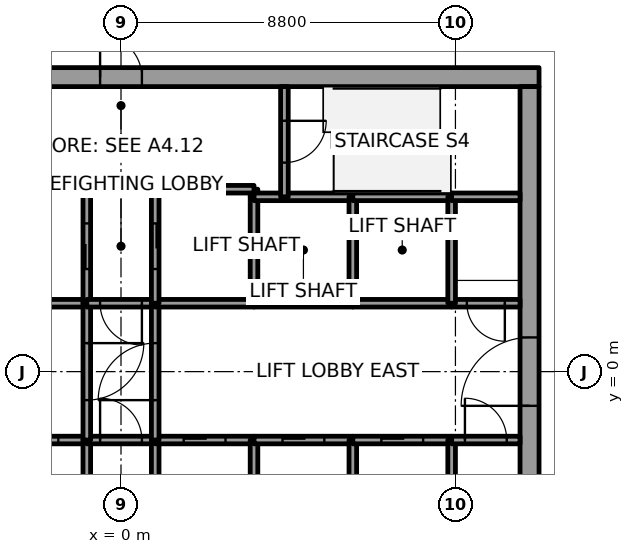
"""IFC4 building model, lengths in metres.
Left out: names, types, materials, properties, quantities, classifications, styles, units other than length and angle.
Written with IfcOpenShell. Run it as: python <this file> out.ifc"""

import sys

from ifc_helpers import new_model, si_unit, direction, frame, frame_2d, origin, place, context, subcontext, project, spatial, rectangle, extrude, element, fill, save


model = new_model("IFC4")
c1 = context("Model", 3, precision=1e-05, world=origin(), true_north=direction((0.0, 1.0)))
c2 = subcontext(c1, "Body", "Model", "MODEL_VIEW")
j1 = project(units=[si_unit("LENGTHUNIT", "METRE"), si_unit("PLANEANGLEUNIT", "RADIAN")], contexts=[c1])
p1 = place(None, origin())
s1 = spatial("IfcSite", under=j1, at=p1, CompositionType="ELEMENT")
p2 = place(p1, origin())
s2 = spatial("IfcBuilding", under=s1, at=p2, CompositionType="ELEMENT")
p3 = place(p2, frame((0.0, 0.0, 59.1)))
s3 = spatial("IfcBuildingStorey", under=s2, at=p3, CompositionType="ELEMENT", Elevation=59.1)
p4 = place(p3, frame((-11.0, 7.75, 0.0), z_axis=(0.0, 0.0, 1.0), x_axis=(1.0, 0.0, 0.0)))
e1 = element("IfcWall", 1, at=p4, inside=s3, PredefinedType="SHEAR", context=c2, shape_type="SweptSolid", body=[
    extrude(rectangle(XDim=22.0, YDim=0.5, at=frame_2d((11.0, 0.0))), origin(), (0.0, 0.0, 1.0), 3.7),
])
p5 = place(p4, frame((10.45, 0.0, 0.0)))
e2 = element("IfcOpeningElement", 2, at=p5, cuts=e1, PredefinedType="OPENING", context=c2, shape_type="SweptSolid", body=[
    extrude(rectangle(XDim=1.1, YDim=2.1, at=frame_2d((0.55, 1.05))), frame((0.0, 0.25, 0.0), z_axis=(0.0, -1.0, 0.0), x_axis=(1.0, 0.0, 0.0)), (0.0, 0.0, 1.0), 0.5),
])
p6 = place(p3, frame((10.75, -7.5, 0.0), z_axis=(0.0, 0.0, 1.0), x_axis=(0.0, 1.0, 0.0)))
e3 = element("IfcWall", 3, at=p6, inside=s3, PredefinedType="SHEAR", context=c2, shape_type="SweptSolid", body=[
    extrude(rectangle(XDim=15.0, YDim=0.5, at=frame_2d((7.5, 0.0))), origin(), (0.0, 0.0, 1.0), 3.7),
])
p7 = place(p6, frame((6.6, 0.0, 0.0)))
e4 = element("IfcOpeningElement", 4, at=p7, cuts=e3, PredefinedType="OPENING", context=c2, shape_type="SweptSolid", body=[
    extrude(rectangle(XDim=1.8, YDim=2.1, at=frame_2d((0.9, 1.05))), frame((0.0, 0.25, 0.0), z_axis=(0.0, -1.0, 0.0), x_axis=(1.0, 0.0, 0.0)), (0.0, 0.0, 1.0), 0.5),
])
p8 = place(p3, frame((-3.5, -1.8, 0.0), z_axis=(0.0, 0.0, 1.0), x_axis=(1.0, 0.0, 0.0)))
e5 = element("IfcWall", 5, at=p8, inside=s3, PredefinedType="SOLIDWALL", context=c2, shape_type="SweptSolid", body=[
    extrude(rectangle(XDim=2.6, YDim=0.2, at=frame_2d((1.3, 0.0))), origin(), (0.0, 0.0, 1.0), 3.55),
])
p9 = place(p8, frame((0.75, 0.0, 0.0)))
e6 = element("IfcOpeningElement", 6, at=p9, cuts=e5, PredefinedType="OPENING", context=c2, shape_type="SweptSolid", body=[
    extrude(rectangle(XDim=1.1, YDim=2.1, at=frame_2d((0.55, 1.05))), frame((0.0, 0.1, 0.0), z_axis=(0.0, -1.0, 0.0), x_axis=(1.0, 0.0, 0.0)), (0.0, 0.0, 1.0), 0.2),
])
p10 = place(p3, frame((-0.9, 1.8, 0.0), z_axis=(0.0, 0.0, 1.0), x_axis=(-1.0, 0.0, 0.0)))
e7 = element("IfcWall", 7, at=p10, inside=s3, PredefinedType="SOLIDWALL", context=c2, shape_type="SweptSolid", body=[
    extrude(rectangle(XDim=2.6, YDim=0.2, at=frame_2d((1.3, 0.0))), origin(), (0.0, 0.0, 1.0), 3.55),
])
p11 = place(p3, frame((-0.9, 1.8, 0.0), z_axis=(0.0, 0.0, 1.0), x_axis=(0.0, 1.0, 0.0)))
e8 = element("IfcWall", 8, at=p11, inside=s3, PredefinedType="SOLIDWALL", context=c2, shape_type="SweptSolid", body=[
    extrude(rectangle(XDim=3.0, YDim=0.2, at=frame_2d((1.5, 0.0))), origin(), (0.0, 0.0, 1.0), 3.55),
])
p12 = place(p11, frame((0.9, 0.0, 0.0)))
e9 = element("IfcOpeningElement", 9, at=p12, cuts=e8, PredefinedType="OPENING", context=c2, shape_type="SweptSolid", body=[
    extrude(rectangle(XDim=1.2, YDim=2.1, at=frame_2d((0.6, 1.05))), frame((0.0, 0.1, 0.0), z_axis=(0.0, -1.0, 0.0), x_axis=(1.0, 0.0, 0.0)), (0.0, 0.0, 1.0), 0.2),
])
p13 = place(p3, frame((-0.9, 4.8, 0.0), z_axis=(0.0, 0.0, 1.0), x_axis=(-1.0, 0.0, 0.0)))
e10 = element("IfcWall", 10, at=p13, inside=s3, PredefinedType="SOLIDWALL", context=c2, shape_type="SweptSolid", body=[
    extrude(rectangle(XDim=2.6, YDim=0.2, at=frame_2d((1.3, 0.0))), origin(), (0.0, 0.0, 1.0), 3.55),
])
p14 = place(p3, frame((-0.9, -4.6, 0.0), z_axis=(0.0, 0.0, 1.0), x_axis=(0.0, 1.0, 0.0)))
e11 = element("IfcWall", 11, at=p14, inside=s3, PredefinedType="SOLIDWALL", context=c2, shape_type="SweptSolid", body=[
    extrude(rectangle(XDim=2.8, YDim=0.2, at=frame_2d((1.4, 0.0))), origin(), (0.0, 0.0, 1.0), 3.55),
])
p15 = place(p3, frame((-0.9, -1.8, 0.0), z_axis=(0.0, 0.0, 1.0), x_axis=(1.0, 0.0, 0.0)))
e12 = element("IfcWall", 12, at=p15, inside=s3, PredefinedType="SOLIDWALL", context=c2, shape_type="SweptSolid", body=[
    extrude(rectangle(XDim=1.8, YDim=0.2, at=frame_2d((0.9, 0.0))), origin(), (0.0, 0.0, 1.0), 3.55),
])
p16 = place(p15, frame((0.35, 0.0, 0.0)))
e13 = element("IfcOpeningElement", 13, at=p16, cuts=e12, PredefinedType="OPENING", context=c2, shape_type="SweptSolid", body=[
    extrude(rectangle(XDim=1.1, YDim=2.1, at=frame_2d((0.55, 1.05))), frame((0.0, 0.1, 0.0), z_axis=(0.0, -1.0, 0.0), x_axis=(1.0, 0.0, 0.0)), (0.0, 0.0, 1.0), 0.2),
])
p17 = place(p3, frame((-0.9, 1.8, 0.0), z_axis=(0.0, 0.0, 1.0), x_axis=(0.0, -1.0, 0.0)))
e14 = element("IfcWall", 14, at=p17, inside=s3, PredefinedType="SOLIDWALL", context=c2, shape_type="SweptSolid", body=[
    extrude(rectangle(XDim=3.6, YDim=0.2, at=frame_2d((1.8, 0.0))), origin(), (0.0, 0.0, 1.0), 3.55),
])
p18 = place(p17, frame((1.05, 0.0, 0.0)))
e15 = element("IfcOpeningElement", 15, at=p18, cuts=e14, PredefinedType="OPENING", context=c2, shape_type="SweptSolid", body=[
    extrude(rectangle(XDim=1.5, YDim=2.1, at=frame_2d((0.75, 1.05))), frame((0.0, 0.1, 0.0), z_axis=(0.0, -1.0, 0.0), x_axis=(1.0, 0.0, 0.0)), (0.0, 0.0, 1.0), 0.2),
])
p19 = place(p3, frame((0.9, 1.8, 0.0), z_axis=(0.0, 0.0, 1.0), x_axis=(-1.0, 0.0, 0.0)))
e16 = element("IfcWall", 16, at=p19, inside=s3, PredefinedType="SOLIDWALL", context=c2, shape_type="SweptSolid", body=[
    extrude(rectangle(XDim=1.8, YDim=0.2, at=frame_2d((0.9, 0.0))), origin(), (0.0, 0.0, 1.0), 3.55),
])
p20 = place(p19, frame((0.35, 0.0, 0.0)))
e17 = element("IfcOpeningElement", 17, at=p20, cuts=e16, PredefinedType="OPENING", context=c2, shape_type="SweptSolid", body=[
    extrude(rectangle(XDim=1.1, YDim=2.1, at=frame_2d((0.55, 1.05))), frame((0.0, 0.1, 0.0), z_axis=(0.0, -1.0, 0.0), x_axis=(1.0, 0.0, 0.0)), (0.0, 0.0, 1.0), 0.2),
])
p21 = place(p3, frame((0.9, -1.8, 0.0), z_axis=(0.0, 0.0, 1.0), x_axis=(0.0, -1.0, 0.0)))
e18 = element("IfcWall", 18, at=p21, inside=s3, PredefinedType="SOLIDWALL", context=c2, shape_type="SweptSolid", body=[
    extrude(rectangle(XDim=2.8, YDim=0.2, at=frame_2d((1.4, 0.0))), origin(), (0.0, 0.0, 1.0), 3.55),
])
p22 = place(p3, frame((0.9, -1.8, 0.0), z_axis=(0.0, 0.0, 1.0), x_axis=(1.0, 0.0, 0.0)))
e19 = element("IfcWall", 19, at=p22, inside=s3, PredefinedType="SOLIDWALL", context=c2, shape_type="SweptSolid", body=[
    extrude(rectangle(XDim=2.6, YDim=0.2, at=frame_2d((1.3, 0.0))), origin(), (0.0, 0.0, 1.0), 3.55),
])
p23 = place(p22, frame((0.75, 0.0, 0.0)))
e20 = element("IfcOpeningElement", 20, at=p23, cuts=e19, PredefinedType="OPENING", context=c2, shape_type="SweptSolid", body=[
    extrude(rectangle(XDim=1.1, YDim=2.1, at=frame_2d((0.55, 1.05))), frame((0.0, 0.1, 0.0), z_axis=(0.0, -1.0, 0.0), x_axis=(1.0, 0.0, 0.0)), (0.0, 0.0, 1.0), 0.2),
])
p24 = place(p3, frame((0.9, -1.8, 0.0), z_axis=(0.0, 0.0, 1.0), x_axis=(0.0, 1.0, 0.0)))
e21 = element("IfcWall", 21, at=p24, inside=s3, PredefinedType="SOLIDWALL", context=c2, shape_type="SweptSolid", body=[
    extrude(rectangle(XDim=3.6, YDim=0.2, at=frame_2d((1.8, 0.0))), origin(), (0.0, 0.0, 1.0), 3.55),
])
p25 = place(p24, frame((1.05, 0.0, 0.0)))
e22 = element("IfcOpeningElement", 22, at=p25, cuts=e21, PredefinedType="OPENING", context=c2, shape_type="SweptSolid", body=[
    extrude(rectangle(XDim=1.5, YDim=2.1, at=frame_2d((0.75, 1.05))), frame((0.0, 0.1, 0.0), z_axis=(0.0, -1.0, 0.0), x_axis=(1.0, 0.0, 0.0)), (0.0, 0.0, 1.0), 0.2),
])
p26 = place(p3, frame((3.5, 1.8, 0.0), z_axis=(0.0, 0.0, 1.0), x_axis=(-1.0, 0.0, 0.0)))
e23 = element("IfcWall", 23, at=p26, inside=s3, PredefinedType="SOLIDWALL", context=c2, shape_type="SweptSolid", body=[
    extrude(rectangle(XDim=2.6, YDim=0.2, at=frame_2d((1.3, 0.0))), origin(), (0.0, 0.0, 1.0), 3.55),
])
p27 = place(p3, frame((3.5, 4.6, 0.0), z_axis=(0.0, 0.0, 1.0), x_axis=(0.0, 1.0, 0.0)))
e24 = element("IfcWall", 24, at=p27, inside=s3, PredefinedType="SOLIDWALL", context=c2, shape_type="SweptSolid", body=[
    extrude(rectangle(XDim=0.2, YDim=0.2, at=frame_2d((0.1, 0.0))), origin(), (0.0, 0.0, 1.0), 3.55),
])
p28 = place(p3, frame((3.5, 4.8, 0.0), z_axis=(0.0, 0.0, 1.0), x_axis=(-1.0, 0.0, 0.0)))
e25 = element("IfcWall", 25, at=p28, inside=s3, PredefinedType="SOLIDWALL", context=c2, shape_type="SweptSolid", body=[
    extrude(rectangle(XDim=2.6, YDim=0.2, at=frame_2d((1.3, 0.0))), origin(), (0.0, 0.0, 1.0), 3.55),
])
p29 = place(p3, frame((0.9, 4.8, 0.0), z_axis=(0.0, 0.0, 1.0), x_axis=(0.0, -1.0, 0.0)))
e26 = element("IfcWall", 26, at=p29, inside=s3, PredefinedType="SOLIDWALL", context=c2, shape_type="SweptSolid", body=[
    extrude(rectangle(XDim=3.0, YDim=0.2, at=frame_2d((1.5, 0.0))), origin(), (0.0, 0.0, 1.0), 3.55),
])
p30 = place(p29, frame((0.9, 0.0, 0.0)))
e27 = element("IfcOpeningElement", 27, at=p30, cuts=e26, PredefinedType="OPENING", context=c2, shape_type="SweptSolid", body=[
    extrude(rectangle(XDim=1.2, YDim=2.1, at=frame_2d((0.6, 1.05))), frame((0.0, 0.1, 0.0), z_axis=(0.0, -1.0, 0.0), x_axis=(1.0, 0.0, 0.0)), (0.0, 0.0, 1.0), 0.2),
])
p31 = place(p3, frame((3.5, -4.6, 0.0), z_axis=(0.0, 0.0, 1.0), x_axis=(0.0, 1.0, 0.0)))
e28 = element("IfcWall", 28, at=p31, inside=s3, PredefinedType="SOLIDWALL", context=c2, shape_type="SweptSolid", body=[
    extrude(rectangle(XDim=2.8, YDim=0.2, at=frame_2d((1.4, 0.0))), origin(), (0.0, 0.0, 1.0), 3.55),
])
p32 = place(p3, frame((3.5, -1.8, 0.0), z_axis=(0.0, 0.0, 1.0), x_axis=(1.0, 0.0, 0.0)))
e29 = element("IfcWall", 29, at=p32, inside=s3, PredefinedType="SOLIDWALL", context=c2, shape_type="SweptSolid", body=[
    extrude(rectangle(XDim=2.6, YDim=0.2, at=frame_2d((1.3, 0.0))), origin(), (0.0, 0.0, 1.0), 3.55),
])
p33 = place(p32, frame((0.75, 0.0, 0.0)))
e30 = element("IfcOpeningElement", 30, at=p33, cuts=e29, PredefinedType="OPENING", context=c2, shape_type="SweptSolid", body=[
    extrude(rectangle(XDim=1.1, YDim=2.1, at=frame_2d((0.55, 1.05))), frame((0.0, 0.1, 0.0), z_axis=(0.0, -1.0, 0.0), x_axis=(1.0, 0.0, 0.0)), (0.0, 0.0, 1.0), 0.2),
])
p34 = place(p3, frame((6.1, 1.8, 0.0), z_axis=(0.0, 0.0, 1.0), x_axis=(-1.0, 0.0, 0.0)))
e31 = element("IfcWall", 31, at=p34, inside=s3, PredefinedType="SOLIDWALL", context=c2, shape_type="SweptSolid", body=[
    extrude(rectangle(XDim=2.6, YDim=0.2, at=frame_2d((1.3, 0.0))), origin(), (0.0, 0.0, 1.0), 3.55),
])
p35 = place(p3, frame((3.5, 1.8, 0.0), z_axis=(0.0, 0.0, 1.0), x_axis=(0.0, 1.0, 0.0)))
e32 = element("IfcWall", 32, at=p35, inside=s3, PredefinedType="SOLIDWALL", context=c2, shape_type="SweptSolid", body=[
    extrude(rectangle(XDim=2.8, YDim=0.2, at=frame_2d((1.4, 0.0))), origin(), (0.0, 0.0, 1.0), 3.55),
])
p36 = place(p3, frame((4.3, 4.6, 0.0), z_axis=(0.0, 0.0, 1.0), x_axis=(-1.0, 0.0, 0.0)))
e33 = element("IfcWall", 33, at=p36, inside=s3, PredefinedType="SOLIDWALL", context=c2, shape_type="SweptSolid", body=[
    extrude(rectangle(XDim=0.8, YDim=0.2, at=frame_2d((0.4, 0.0))), origin(), (0.0, 0.0, 1.0), 3.55),
])
p37 = place(p3, frame((6.1, 4.6, 0.0), z_axis=(0.0, 0.0, 1.0), x_axis=(-1.0, 0.0, 0.0)))
e34 = element("IfcWall", 34, at=p37, inside=s3, PredefinedType="SOLIDWALL", context=c2, shape_type="SweptSolid", body=[
    extrude(rectangle(XDim=1.8, YDim=0.2, at=frame_2d((0.9, 0.0))), origin(), (0.0, 0.0, 1.0), 3.55),
])
p38 = place(p3, frame((4.3, 7.5, 0.0), z_axis=(0.0, 0.0, 1.0), x_axis=(0.0, -1.0, 0.0)))
e35 = element("IfcWall", 35, at=p38, inside=s3, PredefinedType="SOLIDWALL", context=c2, shape_type="SweptSolid", body=[
    extrude(rectangle(XDim=2.9, YDim=0.2, at=frame_2d((1.45, 0.0))), origin(), (0.0, 0.0, 1.0), 3.55),
])
p39 = place(p38, frame((0.9, 0.0, 0.0)))
e36 = element("IfcOpeningElement", 36, at=p39, cuts=e35, PredefinedType="OPENING", context=c2, shape_type="SweptSolid", body=[
    extrude(rectangle(XDim=1.1, YDim=2.1, at=frame_2d((0.55, 1.05))), frame((0.0, 0.1, 0.0), z_axis=(0.0, -1.0, 0.0), x_axis=(1.0, 0.0, 0.0)), (0.0, 0.0, 1.0), 0.2),
])
p40 = place(p3, frame((6.1, -4.6, 0.0), z_axis=(0.0, 0.0, 1.0), x_axis=(0.0, 1.0, 0.0)))
e37 = element("IfcWall", 37, at=p40, inside=s3, PredefinedType="SOLIDWALL", context=c2, shape_type="SweptSolid", body=[
    extrude(rectangle(XDim=2.8, YDim=0.2, at=frame_2d((1.4, 0.0))), origin(), (0.0, 0.0, 1.0), 3.55),
])
p41 = place(p3, frame((6.1, -1.8, 0.0), z_axis=(0.0, 0.0, 1.0), x_axis=(1.0, 0.0, 0.0)))
e38 = element("IfcWall", 38, at=p41, inside=s3, PredefinedType="SOLIDWALL", context=c2, shape_type="SweptSolid", body=[
    extrude(rectangle(XDim=2.6, YDim=0.2, at=frame_2d((1.3, 0.0))), origin(), (0.0, 0.0, 1.0), 3.55),
])
p42 = place(p41, frame((0.75, 0.0, 0.0)))
e39 = element("IfcOpeningElement", 39, at=p42, cuts=e38, PredefinedType="OPENING", context=c2, shape_type="SweptSolid", body=[
    extrude(rectangle(XDim=1.1, YDim=2.1, at=frame_2d((0.55, 1.05))), frame((0.0, 0.1, 0.0), z_axis=(0.0, -1.0, 0.0), x_axis=(1.0, 0.0, 0.0)), (0.0, 0.0, 1.0), 0.2),
])
p43 = place(p3, frame((8.7, 1.8, 0.0), z_axis=(0.0, 0.0, 1.0), x_axis=(-1.0, 0.0, 0.0)))
e40 = element("IfcWall", 40, at=p43, inside=s3, PredefinedType="SOLIDWALL", context=c2, shape_type="SweptSolid", body=[
    extrude(rectangle(XDim=2.6, YDim=0.2, at=frame_2d((1.3, 0.0))), origin(), (0.0, 0.0, 1.0), 3.55),
])
p44 = place(p3, frame((6.1, 1.8, 0.0), z_axis=(0.0, 0.0, 1.0), x_axis=(0.0, 1.0, 0.0)))
e41 = element("IfcWall", 41, at=p44, inside=s3, PredefinedType="SOLIDWALL", context=c2, shape_type="SweptSolid", body=[
    extrude(rectangle(XDim=2.8, YDim=0.2, at=frame_2d((1.4, 0.0))), origin(), (0.0, 0.0, 1.0), 3.55),
])
p45 = place(p3, frame((8.7, 4.6, 0.0), z_axis=(0.0, 0.0, 1.0), x_axis=(-1.0, 0.0, 0.0)))
e42 = element("IfcWall", 42, at=p45, inside=s3, PredefinedType="SOLIDWALL", context=c2, shape_type="SweptSolid", body=[
    extrude(rectangle(XDim=2.6, YDim=0.2, at=frame_2d((1.3, 0.0))), origin(), (0.0, 0.0, 1.0), 3.55),
])
p46 = place(p3, frame((8.7, -1.8, 0.0), z_axis=(0.0, 0.0, 1.0), x_axis=(0.0, -1.0, 0.0)))
e43 = element("IfcWall", 43, at=p46, inside=s3, PredefinedType="SOLIDWALL", context=c2, shape_type="SweptSolid", body=[
    extrude(rectangle(XDim=2.8, YDim=0.2, at=frame_2d((1.4, 0.0))), origin(), (0.0, 0.0, 1.0), 3.55),
])
p47 = place(p3, frame((8.7, -1.8, 0.0), z_axis=(0.0, 0.0, 1.0), x_axis=(1.0, 0.0, 0.0)))
e44 = element("IfcWall", 44, at=p47, inside=s3, PredefinedType="SOLIDWALL", context=c2, shape_type="SweptSolid", body=[
    extrude(rectangle(XDim=1.8, YDim=0.2, at=frame_2d((0.9, 0.0))), origin(), (0.0, 0.0, 1.0), 3.55),
])
p48 = place(p47, frame((0.35, 0.0, 0.0)))
e45 = element("IfcOpeningElement", 45, at=p48, cuts=e44, PredefinedType="OPENING", context=c2, shape_type="SweptSolid", body=[
    extrude(rectangle(XDim=1.1, YDim=2.1, at=frame_2d((0.55, 1.05))), frame((0.0, 0.1, 0.0), z_axis=(0.0, -1.0, 0.0), x_axis=(1.0, 0.0, 0.0)), (0.0, 0.0, 1.0), 0.2),
])
p49 = place(p3, frame((10.5, 1.8, 0.0), z_axis=(0.0, 0.0, 1.0), x_axis=(-1.0, 0.0, 0.0)))
e46 = element("IfcWall", 46, at=p49, inside=s3, PredefinedType="SOLIDWALL", context=c2, shape_type="SweptSolid", body=[
    extrude(rectangle(XDim=1.8, YDim=0.2, at=frame_2d((0.9, 0.0))), origin(), (0.0, 0.0, 1.0), 3.55),
])
p50 = place(p49, frame((0.4, 0.0, 0.0)))
e47 = element("IfcOpeningElement", 47, at=p50, cuts=e46, PredefinedType="OPENING", context=c2, shape_type="SweptSolid", body=[
    extrude(rectangle(XDim=1.0, YDim=2.1, at=frame_2d((0.5, 1.05))), frame((0.0, 0.1, 0.0), z_axis=(0.0, -1.0, 0.0), x_axis=(1.0, 0.0, 0.0)), (0.0, 0.0, 1.0), 0.2),
])
p51 = place(p3, frame((8.7, 4.6, 0.0), z_axis=(0.0, 0.0, 1.0), x_axis=(0.0, -1.0, 0.0)))
e48 = element("IfcWall", 48, at=p51, inside=s3, PredefinedType="SOLIDWALL", context=c2, shape_type="SweptSolid", body=[
    extrude(rectangle(XDim=2.8, YDim=0.2, at=frame_2d((1.4, 0.0))), origin(), (0.0, 0.0, 1.0), 3.55),
])
p52 = place(p3, frame((10.5, 4.6, 0.0), z_axis=(0.0, 0.0, 1.0), x_axis=(-1.0, 0.0, 0.0)))
e49 = element("IfcWall", 49, at=p52, inside=s3, PredefinedType="SOLIDWALL", context=c2, shape_type="SweptSolid", body=[
    extrude(rectangle(XDim=1.8, YDim=0.2, at=frame_2d((0.9, 0.0))), origin(), (0.0, 0.0, 1.0), 3.55),
])
p53 = place(p9, origin())
e50 = element("IfcDoor", 50, at=p53, inside=s3, OperationType="SLIDING_TO_RIGHT", PredefinedType="DOOR", context=c2, shape_type="SweptSolid", body=[
    extrude(rectangle(XDim=1.1, YDim=2.1, at=frame_2d((0.55, 1.05))), frame((0.0, 0.025, 0.0), z_axis=(0.0, -1.0, 0.0), x_axis=(1.0, 0.0, 0.0)), (0.0, 0.0, 1.0), 0.05),
])
fill(e6, e50)
p54 = place(p23, origin())
e51 = element("IfcDoor", 51, at=p54, inside=s3, OperationType="SLIDING_TO_RIGHT", PredefinedType="DOOR", context=c2, shape_type="SweptSolid", body=[
    extrude(rectangle(XDim=1.1, YDim=2.1, at=frame_2d((0.55, 1.05))), frame((0.0, 0.025, 0.0), z_axis=(0.0, -1.0, 0.0), x_axis=(1.0, 0.0, 0.0)), (0.0, 0.0, 1.0), 0.05),
])
fill(e20, e51)
p55 = place(p33, origin())
e52 = element("IfcDoor", 52, at=p55, inside=s3, OperationType="SLIDING_TO_LEFT", PredefinedType="DOOR", context=c2, shape_type="SweptSolid", body=[
    extrude(rectangle(XDim=1.1, YDim=2.1, at=frame_2d((0.55, 1.05))), frame((0.0, 0.025, 0.0), z_axis=(0.0, -1.0, 0.0), x_axis=(1.0, 0.0, 0.0)), (0.0, 0.0, 1.0), 0.05),
])
fill(e30, e52)
p56 = place(p42, origin())
e53 = element("IfcDoor", 53, at=p56, inside=s3, OperationType="SLIDING_TO_LEFT", PredefinedType="DOOR", context=c2, shape_type="SweptSolid", body=[
    extrude(rectangle(XDim=1.1, YDim=2.1, at=frame_2d((0.55, 1.05))), frame((0.0, 0.025, 0.0), z_axis=(0.0, -1.0, 0.0), x_axis=(1.0, 0.0, 0.0)), (0.0, 0.0, 1.0), 0.05),
])
fill(e39, e53)
p57 = place(p12, origin())
e54 = element("IfcDoor", 54, at=p57, inside=s3, OperationType="SLIDING_TO_RIGHT", PredefinedType="DOOR", context=c2, shape_type="SweptSolid", body=[
    extrude(rectangle(XDim=1.2, YDim=2.1, at=frame_2d((0.6, 1.05))), frame((0.0, 0.025, 0.0), z_axis=(0.0, -1.0, 0.0), x_axis=(1.0, 0.0, 0.0)), (0.0, 0.0, 1.0), 0.05),
])
fill(e9, e54)
p58 = place(p30, origin())
e55 = element("IfcDoor", 55, at=p58, inside=s3, OperationType="SLIDING_TO_LEFT", PredefinedType="DOOR", context=c2, shape_type="SweptSolid", body=[
    extrude(rectangle(XDim=1.2, YDim=2.1, at=frame_2d((0.6, 1.05))), frame((0.0, 0.025, 0.0), z_axis=(0.0, -1.0, 0.0), x_axis=(1.0, 0.0, 0.0)), (0.0, 0.0, 1.0), 0.05),
])
fill(e27, e55)
p59 = place(p18, origin())
e56 = element("IfcDoor", 56, at=p59, inside=s3, OperationType="DOUBLE_DOOR_SINGLE_SWING", PredefinedType="DOOR", context=c2, shape_type="SweptSolid", body=[
    extrude(rectangle(XDim=1.5, YDim=2.1, at=frame_2d((0.75, 1.05))), frame((0.0, 0.025, 0.0), z_axis=(0.0, -1.0, 0.0), x_axis=(1.0, 0.0, 0.0)), (0.0, 0.0, 1.0), 0.05),
])
fill(e15, e56)
p60 = place(p25, origin())
e57 = element("IfcDoor", 57, at=p60, inside=s3, OperationType="DOUBLE_DOOR_SINGLE_SWING", PredefinedType="DOOR", context=c2, shape_type="SweptSolid", body=[
    extrude(rectangle(XDim=1.5, YDim=2.1, at=frame_2d((0.75, 1.05))), frame((0.0, 0.025, 0.0), z_axis=(0.0, -1.0, 0.0), x_axis=(1.0, 0.0, 0.0)), (0.0, 0.0, 1.0), 0.05),
])
fill(e22, e57)
p61 = place(p48, origin())
e58 = element("IfcDoor", 58, at=p61, inside=s3, OperationType="SINGLE_SWING_RIGHT", PredefinedType="DOOR", context=c2, shape_type="SweptSolid", body=[
    extrude(rectangle(XDim=1.1, YDim=2.1, at=frame_2d((0.55, 1.05))), frame((0.0, 0.025, 0.0), z_axis=(0.0, -1.0, 0.0), x_axis=(1.0, 0.0, 0.0)), (0.0, 0.0, 1.0), 0.05),
])
fill(e45, e58)
p62 = place(p20, origin())
e59 = element("IfcDoor", 59, at=p62, inside=s3, OperationType="SINGLE_SWING_RIGHT", PredefinedType="DOOR", context=c2, shape_type="SweptSolid", body=[
    extrude(rectangle(XDim=1.1, YDim=2.1, at=frame_2d((0.55, 1.05))), frame((0.0, 0.025, 0.0), z_axis=(0.0, -1.0, 0.0), x_axis=(1.0, 0.0, 0.0)), (0.0, 0.0, 1.0), 0.05),
])
fill(e17, e59)
p63 = place(p16, origin())
e60 = element("IfcDoor", 60, at=p63, inside=s3, OperationType="SINGLE_SWING_LEFT", PredefinedType="DOOR", context=c2, shape_type="SweptSolid", body=[
    extrude(rectangle(XDim=1.1, YDim=2.1, at=frame_2d((0.55, 1.05))), frame((0.0, 0.025, 0.0), z_axis=(0.0, -1.0, 0.0), x_axis=(1.0, 0.0, 0.0)), (0.0, 0.0, 1.0), 0.05),
])
fill(e13, e60)
p64 = place(p50, origin())
e61 = element("IfcDoor", 61, at=p64, inside=s3, OperationType="SINGLE_SWING_RIGHT", PredefinedType="DOOR", context=c2, shape_type="SweptSolid", body=[
    extrude(rectangle(XDim=1.0, YDim=2.1, at=frame_2d((0.5, 1.05))), frame((0.0, 0.025, 0.0), z_axis=(0.0, -1.0, 0.0), x_axis=(1.0, 0.0, 0.0)), (0.0, 0.0, 1.0), 0.05),
])
fill(e47, e61)
p65 = place(p39, origin())
e62 = element("IfcDoor", 62, at=p65, inside=s3, OperationType="SINGLE_SWING_LEFT", PredefinedType="DOOR", context=c2, shape_type="SweptSolid", body=[
    extrude(rectangle(XDim=1.1, YDim=2.1, at=frame_2d((0.55, 1.05))), frame((0.0, 0.025, 0.0), z_axis=(0.0, -1.0, 0.0), x_axis=(1.0, 0.0, 0.0)), (0.0, 0.0, 1.0), 0.05),
])
fill(e36, e62)
p66 = place(p7, origin())
e63 = element("IfcDoor", 63, at=p66, inside=s3, OperationType="DOUBLE_DOOR_SINGLE_SWING", PredefinedType="DOOR", context=c2, shape_type="SweptSolid", body=[
    extrude(rectangle(XDim=1.8, YDim=2.1, at=frame_2d((0.9, 1.05))), frame((0.0, 0.025, 0.0), z_axis=(0.0, -1.0, 0.0), x_axis=(1.0, 0.0, 0.0)), (0.0, 0.0, 1.0), 0.05),
])
fill(e4, e63)
p67 = place(p5, origin())
e64 = element("IfcDoor", 64, at=p67, inside=s3, OperationType="SINGLE_SWING_LEFT", PredefinedType="DOOR", context=c2, shape_type="SweptSolid", body=[
    extrude(rectangle(XDim=1.1, YDim=2.1, at=frame_2d((0.55, 1.05))), frame((0.0, 0.025, 0.0), z_axis=(0.0, -1.0, 0.0), x_axis=(1.0, 0.0, 0.0)), (0.0, 0.0, 1.0), 0.05),
])
fill(e2, e64)
save(model, sys.argv[1])
